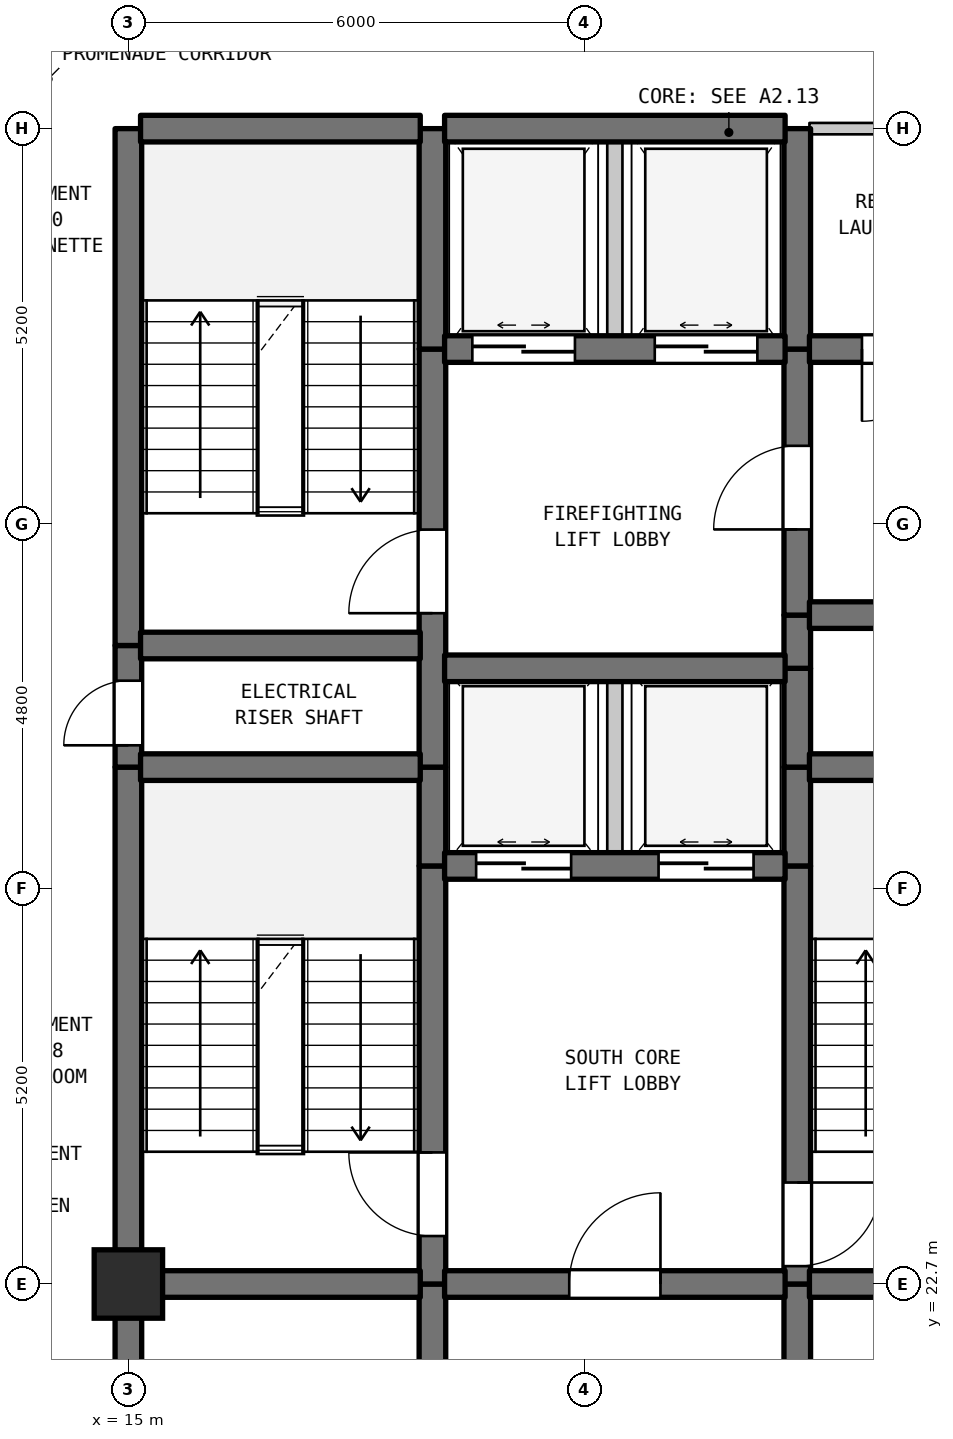
"""IFC4 building model, lengths in metres.
Left out: names, types, materials, properties, quantities, classifications, styles, units other than length and angle.
Written with IfcOpenShell. Run it as: python <this file> out.ifc"""

import sys

from ifc_helpers import new_model, si_unit, direction, frame, frame_2d, origin, origin_2d, place, context, subcontext, project, spatial, rectangle, extrude, element, fill, save


model = new_model("IFC4")
c1 = context("Model", 3, precision=1e-05, world=origin(), true_north=direction((0.0, 1.0)))
c2 = subcontext(c1, "Body", "Model", "MODEL_VIEW")
j1 = project(units=[si_unit("LENGTHUNIT", "METRE"), si_unit("PLANEANGLEUNIT", "RADIAN")], contexts=[c1])
p1 = place(None, origin())
s1 = spatial("IfcSite", under=j1, at=p1, CompositionType="ELEMENT")
p2 = place(p1, origin())
s2 = spatial("IfcBuilding", under=s1, at=p2, CompositionType="ELEMENT")
p3 = place(p2, frame((0.0, 0.0, 199.5)))
s3 = spatial("IfcBuildingStorey", under=s2, at=p3, CompositionType="ELEMENT", Elevation=199.5)
p4 = place(p3, frame((15.0, 22.7, 0.0), z_axis=(0.0, 0.0, 1.0), x_axis=(1.0, 0.0, 0.0)))
e1 = element("IfcColumn", 1, at=p4, inside=s3, PredefinedType="COLUMN", context=c2, shape_type="SweptSolid", body=[
    extrude(rectangle(XDim=0.9, YDim=0.9, at=origin_2d()), origin(), (0.0, 0.0, 1.0), 3.7),
])
p5 = place(p3, frame((15.0, 19.5, 0.0), z_axis=(0.0, 0.0, 1.0), x_axis=(0.0, 1.0, 0.0)))
e2 = element("IfcWall", 2, at=p5, inside=s3, PredefinedType="SHEAR", context=c2, shape_type="SweptSolid", body=[
    extrude(rectangle(XDim=3.2, YDim=0.35, at=frame_2d((1.6, 0.0))), origin(), (0.0, 0.0, 1.0), 3.39),
])
p6 = place(p3, frame((15.0, 22.7, 0.0), z_axis=(0.0, 0.0, 1.0), x_axis=(0.0, 1.0, 0.0)))
e3 = element("IfcWall", 3, at=p6, inside=s3, PredefinedType="SHEAR", context=c2, shape_type="SweptSolid", body=[
    extrude(rectangle(XDim=6.8, YDim=0.35, at=frame_2d((3.4, 0.0))), origin(), (0.0, 0.0, 1.0), 3.39),
])
p7 = place(p3, frame((15.0, 29.5, 0.0), z_axis=(0.0, 0.0, 1.0), x_axis=(0.0, 1.0, 0.0)))
e4 = element("IfcWall", 4, at=p7, inside=s3, PredefinedType="SHEAR", context=c2, shape_type="SweptSolid", body=[
    extrude(rectangle(XDim=1.6, YDim=0.35, at=frame_2d((0.8, 0.0))), origin(), (0.0, 0.0, 1.0), 3.39),
])
p8 = place(p7, frame((0.287, 0.0, 0.0)))
e5 = element("IfcOpeningElement", 5, at=p8, cuts=e4, PredefinedType="OPENING", context=c2, shape_type="SweptSolid", body=[
    extrude(rectangle(XDim=0.85, YDim=2.1, at=frame_2d((0.425, 1.05))), frame((0.0, 0.185, 0.0), z_axis=(0.0, -1.0, 0.0), x_axis=(1.0, 0.0, 0.0)), (0.0, 0.0, 1.0), 0.37),
])
p9 = place(p3, frame((15.0, 31.1, 0.0), z_axis=(0.0, 0.0, 1.0), x_axis=(0.0, 1.0, 0.0)))
e6 = element("IfcWall", 6, at=p9, inside=s3, PredefinedType="SHEAR", context=c2, shape_type="SweptSolid", body=[
    extrude(rectangle(XDim=6.8, YDim=0.35, at=frame_2d((3.4, 0.0))), origin(), (0.0, 0.0, 1.0), 3.39),
])
p10 = place(p3, frame((19.0, 19.5, 0.0), z_axis=(0.0, 0.0, 1.0), x_axis=(0.0, 1.0, 0.0)))
e7 = element("IfcWall", 7, at=p10, inside=s3, PredefinedType="SHEAR", context=c2, shape_type="SweptSolid", body=[
    extrude(rectangle(XDim=3.2, YDim=0.35, at=frame_2d((1.6, 0.0))), origin(), (0.0, 0.0, 1.0), 3.39),
])
p11 = place(p3, frame((19.0, 22.7, 0.0), z_axis=(0.0, 0.0, 1.0), x_axis=(0.0, 1.0, 0.0)))
e8 = element("IfcWall", 8, at=p11, inside=s3, PredefinedType="SHEAR", context=c2, shape_type="SweptSolid", body=[
    extrude(rectangle(XDim=5.5, YDim=0.35, at=frame_2d((2.75, 0.0))), origin(), (0.0, 0.0, 1.0), 3.39),
])
p12 = place(p11, frame((0.631, 0.0, 0.0)))
e9 = element("IfcOpeningElement", 9, at=p12, cuts=e8, PredefinedType="OPENING", context=c2, shape_type="SweptSolid", body=[
    extrude(rectangle(XDim=1.1, YDim=2.15, at=frame_2d((0.55, 1.075))), frame((0.0, 0.185, 0.0), z_axis=(0.0, -1.0, 0.0), x_axis=(1.0, 0.0, 0.0)), (0.0, 0.0, 1.0), 0.37),
])
p13 = place(p3, frame((19.0, 28.2, 0.0), z_axis=(0.0, 0.0, 1.0), x_axis=(0.0, 1.0, 0.0)))
e10 = element("IfcWall", 10, at=p13, inside=s3, PredefinedType="SHEAR", context=c2, shape_type="SweptSolid", body=[
    extrude(rectangle(XDim=1.3, YDim=0.35, at=frame_2d((0.65, 0.0))), origin(), (0.0, 0.0, 1.0), 3.39),
])
p14 = place(p3, frame((19.0, 29.5, 0.0), z_axis=(0.0, 0.0, 1.0), x_axis=(0.0, 1.0, 0.0)))
e11 = element("IfcWall", 11, at=p14, inside=s3, PredefinedType="SHEAR", context=c2, shape_type="SweptSolid", body=[
    extrude(rectangle(XDim=5.5, YDim=0.35, at=frame_2d((2.75, 0.0))), origin(), (0.0, 0.0, 1.0), 3.39),
])
p15 = place(p14, frame((2.025, 0.0, 0.0)))
e12 = element("IfcOpeningElement", 12, at=p15, cuts=e11, PredefinedType="OPENING", context=c2, shape_type="SweptSolid", body=[
    extrude(rectangle(XDim=1.1, YDim=2.15, at=frame_2d((0.55, 1.075))), frame((0.0, 0.185, 0.0), z_axis=(0.0, -1.0, 0.0), x_axis=(1.0, 0.0, 0.0)), (0.0, 0.0, 1.0), 0.37),
])
p16 = place(p3, frame((19.0, 35.0, 0.0), z_axis=(0.0, 0.0, 1.0), x_axis=(0.0, 1.0, 0.0)))
e13 = element("IfcWall", 13, at=p16, inside=s3, PredefinedType="SHEAR", context=c2, shape_type="SweptSolid", body=[
    extrude(rectangle(XDim=2.9, YDim=0.35, at=frame_2d((1.45, 0.0))), origin(), (0.0, 0.0, 1.0), 3.39),
])
p17 = place(p3, frame((21.4, 28.2, 0.0), z_axis=(0.0, 0.0, 1.0), x_axis=(0.0, 1.0, 0.0)))
e14 = element("IfcWall", 14, at=p17, inside=s3, PredefinedType="STANDARD", context=c2, shape_type="SweptSolid", body=[
    extrude(rectangle(XDim=2.6, YDim=0.2, at=frame_2d((1.3, 0.0))), origin(), (0.0, 0.0, 1.0), 3.39),
])
p18 = place(p3, frame((21.4, 35.0, 0.0), z_axis=(0.0, 0.0, 1.0), x_axis=(0.0, 1.0, 0.0)))
e15 = element("IfcWall", 15, at=p18, inside=s3, PredefinedType="STANDARD", context=c2, shape_type="SweptSolid", body=[
    extrude(rectangle(XDim=2.9, YDim=0.2, at=frame_2d((1.45, 0.0))), origin(), (0.0, 0.0, 1.0), 3.39),
])
p19 = place(p3, frame((23.8, 19.5, 0.0), z_axis=(0.0, 0.0, 1.0), x_axis=(0.0, 1.0, 0.0)))
e16 = element("IfcWall", 16, at=p19, inside=s3, PredefinedType="SHEAR", context=c2, shape_type="SweptSolid", body=[
    extrude(rectangle(XDim=3.2, YDim=0.35, at=frame_2d((1.6, 0.0))), origin(), (0.0, 0.0, 1.0), 3.39),
])
p20 = place(p3, frame((23.8, 22.7, 0.0), z_axis=(0.0, 0.0, 1.0), x_axis=(0.0, 1.0, 0.0)))
e17 = element("IfcWall", 17, at=p20, inside=s3, PredefinedType="SHEAR", context=c2, shape_type="SweptSolid", body=[
    extrude(rectangle(XDim=5.5, YDim=0.35, at=frame_2d((2.75, 0.0))), origin(), (0.0, 0.0, 1.0), 3.39),
])
p21 = place(p20, frame((0.235, 0.0, 0.0)))
e18 = element("IfcOpeningElement", 18, at=p21, cuts=e17, PredefinedType="OPENING", context=c2, shape_type="SweptSolid", body=[
    extrude(rectangle(XDim=1.1, YDim=2.15, at=frame_2d((0.55, 1.075))), frame((0.0, 0.185, 0.0), z_axis=(0.0, -1.0, 0.0), x_axis=(1.0, 0.0, 0.0)), (0.0, 0.0, 1.0), 0.37),
])
for number, where, z_axis, x_axis in (
    (19, (23.8, 28.2, 0.0), (0.0, 0.0, 1.0), (0.0, 1.0, 0.0)),
    (20, (23.8, 29.5, 0.0), (0.0, 0.0, 1.0), (0.0, 1.0, 0.0)),
):
    element("IfcWall", number, at=place(p3, frame(where, z_axis=z_axis, x_axis=x_axis)), inside=s3, PredefinedType="SHEAR", context=c2, shape_type="SweptSolid", body=[
        extrude(rectangle(XDim=1.3, YDim=0.35, at=frame_2d((0.65, 0.0))), origin(), (0.0, 0.0, 1.0), 3.39),
    ])
p22 = place(p3, frame((23.8, 30.8, 0.0), z_axis=(0.0, 0.0, 1.0), x_axis=(0.0, 1.0, 0.0)))
e21 = element("IfcWall", 21, at=p22, inside=s3, PredefinedType="SHEAR", context=c2, shape_type="SweptSolid", body=[
    extrude(rectangle(XDim=0.7, YDim=0.35, at=frame_2d((0.35, 0.0))), origin(), (0.0, 0.0, 1.0), 3.39),
])
p23 = place(p3, frame((23.8, 31.5, 0.0), z_axis=(0.0, 0.0, 1.0), x_axis=(0.0, 1.0, 0.0)))
e22 = element("IfcWall", 22, at=p23, inside=s3, PredefinedType="SHEAR", context=c2, shape_type="SweptSolid", body=[
    extrude(rectangle(XDim=3.5, YDim=0.35, at=frame_2d((1.75, 0.0))), origin(), (0.0, 0.0, 1.0), 3.39),
])
p24 = place(p23, frame((1.127, 0.0, 0.0)))
e23 = element("IfcOpeningElement", 23, at=p24, cuts=e22, PredefinedType="OPENING", context=c2, shape_type="SweptSolid", body=[
    extrude(rectangle(XDim=1.1, YDim=2.15, at=frame_2d((0.55, 1.075))), frame((0.0, 0.185, 0.0), z_axis=(0.0, -1.0, 0.0), x_axis=(1.0, 0.0, 0.0)), (0.0, 0.0, 1.0), 0.37),
])
p25 = place(p3, frame((23.8, 35.0, 0.0), z_axis=(0.0, 0.0, 1.0), x_axis=(0.0, 1.0, 0.0)))
e24 = element("IfcWall", 24, at=p25, inside=s3, PredefinedType="SHEAR", context=c2, shape_type="SweptSolid", body=[
    extrude(rectangle(XDim=2.9, YDim=0.35, at=frame_2d((1.45, 0.0))), origin(), (0.0, 0.0, 1.0), 3.39),
])
p26 = place(p3, frame((15.16, 22.7, 0.0), z_axis=(0.0, 0.0, 1.0), x_axis=(1.0, 0.0, 0.0)))
e25 = element("IfcWall", 25, at=p26, inside=s3, PredefinedType="SHEAR", context=c2, shape_type="SweptSolid", body=[
    extrude(rectangle(XDim=3.68, YDim=0.35, at=frame_2d((1.84, 0.0))), origin(), (0.0, 0.0, 1.0), 3.39),
])
p27 = place(p3, frame((19.16, 22.7, 0.0), z_axis=(0.0, 0.0, 1.0), x_axis=(1.0, 0.0, 0.0)))
e26 = element("IfcWall", 26, at=p27, inside=s3, PredefinedType="SHEAR", context=c2, shape_type="SweptSolid", body=[
    extrude(rectangle(XDim=4.48, YDim=0.35, at=frame_2d((2.24, 0.0))), origin(), (0.0, 0.0, 1.0), 3.39),
])
p28 = place(p27, frame((1.64, 0.0, 0.0)))
e27 = element("IfcOpeningElement", 27, at=p28, cuts=e26, PredefinedType="OPENING", context=c2, shape_type="SweptSolid", body=[
    extrude(rectangle(XDim=1.2, YDim=2.2, at=frame_2d((0.6, 1.1))), frame((0.0, 0.185, 0.0), z_axis=(0.0, -1.0, 0.0), x_axis=(1.0, 0.0, 0.0)), (0.0, 0.0, 1.0), 0.37),
])
p29 = place(p3, frame((23.96, 22.7, 0.0), z_axis=(0.0, 0.0, 1.0), x_axis=(1.0, 0.0, 0.0)))
e28 = element("IfcWall", 28, at=p29, inside=s3, PredefinedType="SHEAR", context=c2, shape_type="SweptSolid", body=[
    extrude(rectangle(XDim=1.855, YDim=0.35, at=frame_2d((0.927, 0.0))), origin(), (0.0, 0.0, 1.0), 3.39),
])
p30 = place(p3, frame((19.16, 28.2, 0.0), z_axis=(0.0, 0.0, 1.0), x_axis=(1.0, 0.0, 0.0)))
e29 = element("IfcWall", 29, at=p30, inside=s3, PredefinedType="SHEAR", context=c2, shape_type="SweptSolid", body=[
    extrude(rectangle(XDim=4.48, YDim=0.35, at=frame_2d((2.24, 0.0))), origin(), (0.0, 0.0, 1.0), 3.39),
])
p31 = place(p30, frame((0.415, 0.0, 0.0)))
e30 = element("IfcOpeningElement", 30, at=p31, cuts=e29, PredefinedType="OPENING", context=c2, shape_type="SweptSolid", body=[
    extrude(rectangle(XDim=1.25, YDim=2.2, at=frame_2d((0.625, 1.1))), frame((0.0, 0.185, 0.0), z_axis=(0.0, -1.0, 0.0), x_axis=(1.0, 0.0, 0.0)), (0.0, 0.0, 1.0), 0.37),
])
p32 = place(p30, frame((2.815, 0.0, 0.0)))
e31 = element("IfcOpeningElement", 31, at=p32, cuts=e29, PredefinedType="OPENING", context=c2, shape_type="SweptSolid", body=[
    extrude(rectangle(XDim=1.25, YDim=2.2, at=frame_2d((0.625, 1.1))), frame((0.0, 0.185, 0.0), z_axis=(0.0, -1.0, 0.0), x_axis=(1.0, 0.0, 0.0)), (0.0, 0.0, 1.0), 0.37),
])
p33 = place(p3, frame((15.16, 29.5, 0.0), z_axis=(0.0, 0.0, 1.0), x_axis=(1.0, 0.0, 0.0)))
e32 = element("IfcWall", 32, at=p33, inside=s3, PredefinedType="SHEAR", context=c2, shape_type="SweptSolid", body=[
    extrude(rectangle(XDim=3.68, YDim=0.35, at=frame_2d((1.84, 0.0))), origin(), (0.0, 0.0, 1.0), 3.39),
])
p34 = place(p3, frame((23.96, 29.5, 0.0), z_axis=(0.0, 0.0, 1.0), x_axis=(1.0, 0.0, 0.0)))
e33 = element("IfcWall", 33, at=p34, inside=s3, PredefinedType="SHEAR", context=c2, shape_type="SweptSolid", body=[
    extrude(rectangle(XDim=3.18, YDim=0.35, at=frame_2d((1.59, 0.0))), origin(), (0.0, 0.0, 1.0), 3.39),
])
p35 = place(p3, frame((19.16, 30.8, 0.0), z_axis=(0.0, 0.0, 1.0), x_axis=(1.0, 0.0, 0.0)))
e34 = element("IfcWall", 34, at=p35, inside=s3, PredefinedType="SHEAR", context=c2, shape_type="SweptSolid", body=[
    extrude(rectangle(XDim=4.48, YDim=0.35, at=frame_2d((2.24, 0.0))), origin(), (0.0, 0.0, 1.0), 3.39),
])
p36 = place(p3, frame((15.16, 31.1, 0.0), z_axis=(0.0, 0.0, 1.0), x_axis=(1.0, 0.0, 0.0)))
e35 = element("IfcWall", 35, at=p36, inside=s3, PredefinedType="SHEAR", context=c2, shape_type="SweptSolid", body=[
    extrude(rectangle(XDim=3.68, YDim=0.35, at=frame_2d((1.84, 0.0))), origin(), (0.0, 0.0, 1.0), 3.39),
])
p37 = place(p3, frame((23.96, 31.5, 0.0), z_axis=(0.0, 0.0, 1.0), x_axis=(1.0, 0.0, 0.0)))
e36 = element("IfcWall", 36, at=p37, inside=s3, PredefinedType="SHEAR", context=c2, shape_type="SweptSolid", body=[
    extrude(rectangle(XDim=3.18, YDim=0.35, at=frame_2d((1.59, 0.0))), origin(), (0.0, 0.0, 1.0), 3.39),
])
p38 = place(p37, frame((1.094, 0.0, 0.0)))
e37 = element("IfcOpeningElement", 37, at=p38, cuts=e36, PredefinedType="OPENING", context=c2, shape_type="SweptSolid", body=[
    extrude(rectangle(XDim=0.85, YDim=2.1, at=frame_2d((0.425, 1.05))), frame((0.0, 0.185, 0.0), z_axis=(0.0, -1.0, 0.0), x_axis=(1.0, 0.0, 0.0)), (0.0, 0.0, 1.0), 0.37),
])
p39 = place(p3, frame((19.16, 35.0, 0.0), z_axis=(0.0, 0.0, 1.0), x_axis=(1.0, 0.0, 0.0)))
e38 = element("IfcWall", 38, at=p39, inside=s3, PredefinedType="SHEAR", context=c2, shape_type="SweptSolid", body=[
    extrude(rectangle(XDim=4.48, YDim=0.35, at=frame_2d((2.24, 0.0))), origin(), (0.0, 0.0, 1.0), 3.39),
])
p40 = place(p39, frame((0.365, 0.0, 0.0)))
e39 = element("IfcOpeningElement", 39, at=p40, cuts=e38, PredefinedType="OPENING", context=c2, shape_type="SweptSolid", body=[
    extrude(rectangle(XDim=1.35, YDim=2.2, at=frame_2d((0.675, 1.1))), frame((0.0, 0.185, 0.0), z_axis=(0.0, -1.0, 0.0), x_axis=(1.0, 0.0, 0.0)), (0.0, 0.0, 1.0), 0.37),
])
p41 = place(p39, frame((2.765, 0.0, 0.0)))
e40 = element("IfcOpeningElement", 40, at=p41, cuts=e38, PredefinedType="OPENING", context=c2, shape_type="SweptSolid", body=[
    extrude(rectangle(XDim=1.35, YDim=2.2, at=frame_2d((0.675, 1.1))), frame((0.0, 0.185, 0.0), z_axis=(0.0, -1.0, 0.0), x_axis=(1.0, 0.0, 0.0)), (0.0, 0.0, 1.0), 0.37),
])
p42 = place(p3, frame((23.96, 35.0, 0.0), z_axis=(0.0, 0.0, 1.0), x_axis=(1.0, 0.0, 0.0)))
e41 = element("IfcWall", 41, at=p42, inside=s3, PredefinedType="SHEAR", context=c2, shape_type="SweptSolid", body=[
    extrude(rectangle(XDim=2.595, YDim=0.35, at=frame_2d((1.297, 0.0))), origin(), (0.0, 0.0, 1.0), 3.39),
])
p43 = place(p42, frame((0.691, 0.0, 0.0)))
e42 = element("IfcOpeningElement", 42, at=p43, cuts=e41, PredefinedType="OPENING", context=c2, shape_type="SweptSolid", body=[
    extrude(rectangle(XDim=0.95, YDim=2.15, at=frame_2d((0.475, 1.075))), frame((0.0, 0.185, 0.0), z_axis=(0.0, -1.0, 0.0), x_axis=(1.0, 0.0, 0.0)), (0.0, 0.0, 1.0), 0.37),
])
p44 = place(p3, frame((15.16, 37.9, 0.0), z_axis=(0.0, 0.0, 1.0), x_axis=(1.0, 0.0, 0.0)))
e43 = element("IfcWall", 43, at=p44, inside=s3, PredefinedType="SHEAR", context=c2, shape_type="SweptSolid", body=[
    extrude(rectangle(XDim=3.68, YDim=0.35, at=frame_2d((1.84, 0.0))), origin(), (0.0, 0.0, 1.0), 3.39),
])
p45 = place(p3, frame((19.16, 37.9, 0.0), z_axis=(0.0, 0.0, 1.0), x_axis=(1.0, 0.0, 0.0)))
e44 = element("IfcWall", 44, at=p45, inside=s3, PredefinedType="SHEAR", context=c2, shape_type="SweptSolid", body=[
    extrude(rectangle(XDim=4.48, YDim=0.35, at=frame_2d((2.24, 0.0))), origin(), (0.0, 0.0, 1.0), 3.39),
])
p46 = place(p3, frame((23.96, 37.9, 0.0), z_axis=(0.0, 0.0, 1.0), x_axis=(1.0, 0.0, 0.0)))
e45 = element("IfcWall", 45, at=p46, inside=s3, PredefinedType="STANDARD", context=c2, shape_type="SweptSolid", body=[
    extrude(rectangle(XDim=2.595, YDim=0.15, at=frame_2d((1.297, 0.0))), origin(), (0.0, 0.0, 1.0), 2.89),
])
p47 = place(p8, origin())
e46 = element("IfcDoor", 46, at=p47, inside=s3, OperationType="SINGLE_SWING_LEFT", PredefinedType="DOOR", context=c2, shape_type="SweptSolid", body=[
    extrude(rectangle(XDim=0.85, YDim=2.1, at=frame_2d((0.425, 1.05))), frame((0.0, 0.025, 0.0), z_axis=(0.0, -1.0, 0.0), x_axis=(1.0, 0.0, 0.0)), (0.0, 0.0, 1.0), 0.05),
])
fill(e5, e46)
p48 = place(p12, origin())
e47 = element("IfcDoor", 47, at=p48, inside=s3, OperationType="SINGLE_SWING_RIGHT", PredefinedType="DOOR", context=c2, shape_type="SweptSolid", body=[
    extrude(rectangle(XDim=1.1, YDim=2.15, at=frame_2d((0.55, 1.075))), frame((0.0, 0.025, 0.0), z_axis=(0.0, -1.0, 0.0), x_axis=(1.0, 0.0, 0.0)), (0.0, 0.0, 1.0), 0.05),
])
fill(e9, e47)
p49 = place(p15, origin())
e48 = element("IfcDoor", 48, at=p49, inside=s3, OperationType="SINGLE_SWING_LEFT", PredefinedType="DOOR", context=c2, shape_type="SweptSolid", body=[
    extrude(rectangle(XDim=1.1, YDim=2.15, at=frame_2d((0.55, 1.075))), frame((0.0, 0.025, 0.0), z_axis=(0.0, -1.0, 0.0), x_axis=(1.0, 0.0, 0.0)), (0.0, 0.0, 1.0), 0.05),
])
fill(e12, e48)
p50 = place(p21, frame((1.1, 0.0, 0.0), z_axis=(0.0, 0.0, 1.0), x_axis=(-1.0, 0.0, 0.0)))
e49 = element("IfcDoor", 49, at=p50, inside=s3, OperationType="SINGLE_SWING_RIGHT", PredefinedType="DOOR", context=c2, shape_type="SweptSolid", body=[
    extrude(rectangle(XDim=1.1, YDim=2.15, at=frame_2d((0.55, 1.075))), frame((0.0, 0.025, 0.0), z_axis=(0.0, -1.0, 0.0), x_axis=(1.0, 0.0, 0.0)), (0.0, 0.0, 1.0), 0.05),
])
fill(e18, e49)
p51 = place(p24, origin())
e50 = element("IfcDoor", 50, at=p51, inside=s3, OperationType="SINGLE_SWING_LEFT", PredefinedType="DOOR", context=c2, shape_type="SweptSolid", body=[
    extrude(rectangle(XDim=1.1, YDim=2.15, at=frame_2d((0.55, 1.075))), frame((0.0, 0.025, 0.0), z_axis=(0.0, -1.0, 0.0), x_axis=(1.0, 0.0, 0.0)), (0.0, 0.0, 1.0), 0.05),
])
fill(e23, e50)
p52 = place(p28, origin())
e51 = element("IfcDoor", 51, at=p52, inside=s3, OperationType="SINGLE_SWING_RIGHT", PredefinedType="DOOR", context=c2, shape_type="SweptSolid", body=[
    extrude(rectangle(XDim=1.2, YDim=2.2, at=frame_2d((0.6, 1.1))), frame((0.0, 0.025, 0.0), z_axis=(0.0, -1.0, 0.0), x_axis=(1.0, 0.0, 0.0)), (0.0, 0.0, 1.0), 0.05),
])
fill(e27, e51)
p53 = place(p31, origin())
e52 = element("IfcDoor", 52, at=p53, inside=s3, OperationType="DOUBLE_DOOR_SLIDING", PredefinedType="DOOR", context=c2, shape_type="SweptSolid", body=[
    extrude(rectangle(XDim=1.25, YDim=2.2, at=frame_2d((0.625, 1.1))), frame((0.0, 0.025, 0.0), z_axis=(0.0, -1.0, 0.0), x_axis=(1.0, 0.0, 0.0)), (0.0, 0.0, 1.0), 0.05),
])
fill(e30, e52)
p54 = place(p32, origin())
e53 = element("IfcDoor", 53, at=p54, inside=s3, OperationType="DOUBLE_DOOR_SLIDING", PredefinedType="DOOR", context=c2, shape_type="SweptSolid", body=[
    extrude(rectangle(XDim=1.25, YDim=2.2, at=frame_2d((0.625, 1.1))), frame((0.0, 0.025, 0.0), z_axis=(0.0, -1.0, 0.0), x_axis=(1.0, 0.0, 0.0)), (0.0, 0.0, 1.0), 0.05),
])
fill(e31, e53)
p55 = place(p40, origin())
e54 = element("IfcDoor", 54, at=p55, inside=s3, OperationType="DOUBLE_DOOR_SLIDING", PredefinedType="DOOR", context=c2, shape_type="SweptSolid", body=[
    extrude(rectangle(XDim=1.35, YDim=2.2, at=frame_2d((0.675, 1.1))), frame((0.0, 0.025, 0.0), z_axis=(0.0, -1.0, 0.0), x_axis=(1.0, 0.0, 0.0)), (0.0, 0.0, 1.0), 0.05),
])
fill(e39, e54)
p56 = place(p41, origin())
e55 = element("IfcDoor", 55, at=p56, inside=s3, OperationType="DOUBLE_DOOR_SLIDING", PredefinedType="DOOR", context=c2, shape_type="SweptSolid", body=[
    extrude(rectangle(XDim=1.35, YDim=2.2, at=frame_2d((0.675, 1.1))), frame((0.0, 0.025, 0.0), z_axis=(0.0, -1.0, 0.0), x_axis=(1.0, 0.0, 0.0)), (0.0, 0.0, 1.0), 0.05),
])
fill(e40, e55)
p57 = place(p43, frame((0.95, 0.0, 0.0), z_axis=(0.0, 0.0, 1.0), x_axis=(-1.0, 0.0, 0.0)))
e56 = element("IfcDoor", 56, at=p57, inside=s3, OperationType="SINGLE_SWING_LEFT", PredefinedType="DOOR", context=c2, shape_type="SweptSolid", body=[
    extrude(rectangle(XDim=0.95, YDim=2.15, at=frame_2d((0.475, 1.075))), frame((0.0, 0.025, 0.0), z_axis=(0.0, -1.0, 0.0), x_axis=(1.0, 0.0, 0.0)), (0.0, 0.0, 1.0), 0.05),
])
fill(e42, e56)
save(model, sys.argv[1])
